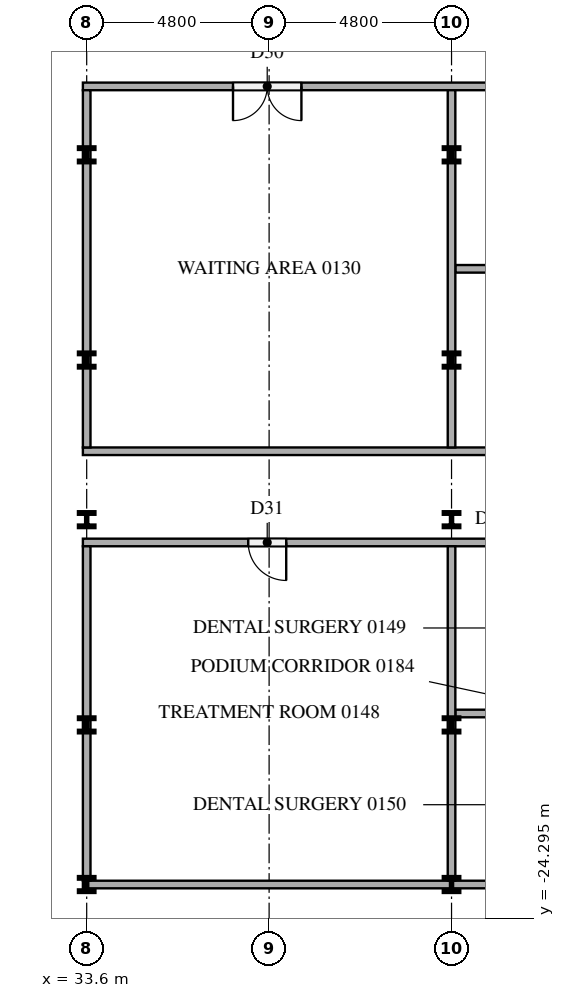
"""IFC4 building model, lengths in metres.
Left out: names, types, materials, properties, quantities, classifications, styles, units other than length and angle.
Written with IfcOpenShell. Run it as: python <this file> out.ifc"""

import sys

from ifc_helpers import new_model, si_unit, direction, frame, frame_2d, origin, origin_2d, place, context, subcontext, project, spatial, rectangle, i_section, extrude, element, fill, save


model = new_model("IFC4")
c1 = context("Model", 3, precision=1e-05, world=origin(), true_north=direction((0.0, 1.0)))
c2 = subcontext(c1, "Body", "Model", "MODEL_VIEW")
j1 = project(units=[si_unit("LENGTHUNIT", "METRE"), si_unit("PLANEANGLEUNIT", "RADIAN")], contexts=[c1])
p1 = place(None, origin())
s1 = spatial("IfcSite", under=j1, at=p1, CompositionType="ELEMENT")
p2 = place(p1, origin())
s2 = spatial("IfcBuilding", under=s1, at=p2, CompositionType="ELEMENT")
p3 = place(p2, frame((0.0, 0.0, 6.0)))
s3 = spatial("IfcBuildingStorey", under=s2, at=p3, CompositionType="ELEMENT", Elevation=6.0)
for number, where, z_axis, x_axis in (
    (1, (33.6, -23.4, 0.0), (0.0, 0.0, 1.0), (1.0, 0.0, 0.0)),
    (2, (33.6, -19.2, 0.0), (0.0, 0.0, 1.0), (1.0, 0.0, 0.0)),
    (3, (33.6, -13.8, 0.0), (0.0, 0.0, 1.0), (1.0, 0.0, 0.0)),
    (4, (33.6, -9.6, 0.0), (0.0, 0.0, 1.0), (1.0, 0.0, 0.0)),
    (5, (33.6, -4.2, 0.0), (0.0, 0.0, 1.0), (1.0, 0.0, 0.0)),
    (6, (43.2, -23.4, 0.0), (0.0, 0.0, 1.0), (1.0, 0.0, 0.0)),
    (7, (43.2, -19.2, 0.0), (0.0, 0.0, 1.0), (1.0, 0.0, 0.0)),
    (8, (43.2, -13.8, 0.0), (0.0, 0.0, 1.0), (1.0, 0.0, 0.0)),
    (9, (43.2, -9.6, 0.0), (0.0, 0.0, 1.0), (1.0, 0.0, 0.0)),
    (10, (43.2, -4.2, 0.0), (0.0, 0.0, 1.0), (1.0, 0.0, 0.0)),
):
    element("IfcColumn", number, at=place(p3, frame(where, z_axis=z_axis, x_axis=x_axis)), inside=s3, PredefinedType="COLUMN", context=c2, shape_type="SweptSolid", body=[
        extrude(i_section(OverallWidth=0.396, OverallDepth=0.381, WebThickness=0.019, FlangeThickness=0.03, at=origin_2d()), origin(), (0.0, 0.0, 1.0), 4.2),
    ])
p4 = place(p3, frame((33.5, -23.4, 0.0), z_axis=(0.0, 0.0, 1.0), x_axis=(1.0, 0.0, 0.0)))
e11 = element("IfcWall", 11, at=p4, inside=s3, PredefinedType="PARTITIONING", context=c2, shape_type="SweptSolid", body=[
    extrude(rectangle(XDim=33.8, YDim=0.2, at=frame_2d((16.9, 0.0))), origin(), (0.0, 0.0, 1.0), 4.2),
])
p5 = place(p4, frame((10.95, 0.0, 0.0)))
e12 = element("IfcOpeningElement", 12, at=p5, cuts=e11, PredefinedType="OPENING", context=c2, shape_type="SweptSolid", body=[
    extrude(rectangle(XDim=1.0, YDim=2.1, at=frame_2d((0.5, 1.05))), frame((0.0, 0.11, 0.0), z_axis=(0.0, -1.0, 0.0), x_axis=(1.0, 0.0, 0.0)), (0.0, 0.0, 1.0), 0.22),
])
p6 = place(p4, frame((15.75, 0.0, 0.0)))
e13 = element("IfcOpeningElement", 13, at=p6, cuts=e11, PredefinedType="OPENING", context=c2, shape_type="SweptSolid", body=[
    extrude(rectangle(XDim=1.0, YDim=2.1, at=frame_2d((0.5, 1.05))), frame((0.0, 0.11, 0.0), z_axis=(0.0, -1.0, 0.0), x_axis=(1.0, 0.0, 0.0)), (0.0, 0.0, 1.0), 0.22),
])
p7 = place(p4, frame((30.85, 0.0, 0.0)))
e14 = element("IfcOpeningElement", 14, at=p7, cuts=e11, PredefinedType="OPENING", context=c2, shape_type="SweptSolid", body=[
    extrude(rectangle(XDim=1.0, YDim=2.1, at=frame_2d((0.5, 1.05))), frame((0.0, 0.11, 0.0), z_axis=(0.0, -1.0, 0.0), x_axis=(1.0, 0.0, 0.0)), (0.0, 0.0, 1.0), 0.22),
])
p8 = place(p3, frame((43.3, -18.9, 0.0), z_axis=(0.0, 0.0, 1.0), x_axis=(1.0, 0.0, 0.0)))
e15 = element("IfcWall", 15, at=p8, inside=s3, PredefinedType="PARTITIONING", context=c2, shape_type="SweptSolid", body=[
    extrude(rectangle(XDim=9.4, YDim=0.2, at=frame_2d((4.7, 0.0))), origin(), (0.0, 0.0, 1.0), 4.2),
])
p9 = place(p3, frame((55.8, -14.4, 0.0), z_axis=(0.0, 0.0, 1.0), x_axis=(-1.0, 0.0, 0.0)))
e16 = element("IfcWall", 16, at=p9, inside=s3, PredefinedType="PARTITIONING", context=c2, shape_type="SweptSolid", body=[
    extrude(rectangle(XDim=22.3, YDim=0.2, at=frame_2d((11.15, 0.0))), origin(), (0.0, 0.0, 1.0), 4.2),
])
p10 = place(p9, frame((16.95, 0.0, 0.0)))
e17 = element("IfcOpeningElement", 17, at=p10, cuts=e16, PredefinedType="OPENING", context=c2, shape_type="SweptSolid", body=[
    extrude(rectangle(XDim=1.0, YDim=2.1, at=frame_2d((0.5, 1.05))), frame((0.0, 0.11, 0.0), z_axis=(0.0, -1.0, 0.0), x_axis=(1.0, 0.0, 0.0)), (0.0, 0.0, 1.0), 0.22),
])
p11 = place(p9, frame((10.25, 0.0, 0.0)))
e18 = element("IfcOpeningElement", 18, at=p11, cuts=e16, PredefinedType="OPENING", context=c2, shape_type="SweptSolid", body=[
    extrude(rectangle(XDim=1.0, YDim=2.1, at=frame_2d((0.5, 1.05))), frame((0.0, 0.11, 0.0), z_axis=(0.0, -1.0, 0.0), x_axis=(1.0, 0.0, 0.0)), (0.0, 0.0, 1.0), 0.22),
])
p12 = place(p9, frame((5.45, 0.0, 0.0)))
e19 = element("IfcOpeningElement", 19, at=p12, cuts=e16, PredefinedType="OPENING", context=c2, shape_type="SweptSolid", body=[
    extrude(rectangle(XDim=1.0, YDim=2.1, at=frame_2d((0.5, 1.05))), frame((0.0, 0.11, 0.0), z_axis=(0.0, -1.0, 0.0), x_axis=(1.0, 0.0, 0.0)), (0.0, 0.0, 1.0), 0.22),
])
p13 = place(p3, frame((33.5, -12.0, 0.0), z_axis=(0.0, 0.0, 1.0), x_axis=(1.0, 0.0, 0.0)))
e20 = element("IfcWall", 20, at=p13, inside=s3, PredefinedType="PARTITIONING", context=c2, shape_type="SweptSolid", body=[
    extrude(rectangle(XDim=33.8, YDim=0.2, at=frame_2d((16.9, 0.0))), origin(), (0.0, 0.0, 1.0), 4.2),
])
p14 = place(p13, frame((12.15, 0.0, 0.0)))
e21 = element("IfcOpeningElement", 21, at=p14, cuts=e20, PredefinedType="OPENING", context=c2, shape_type="SweptSolid", body=[
    extrude(rectangle(XDim=1.0, YDim=2.1, at=frame_2d((0.5, 1.05))), frame((0.0, 0.11, 0.0), z_axis=(0.0, -1.0, 0.0), x_axis=(1.0, 0.0, 0.0)), (0.0, 0.0, 1.0), 0.22),
])
p15 = place(p13, frame((17.55, 0.0, 0.0)))
e22 = element("IfcOpeningElement", 22, at=p15, cuts=e20, PredefinedType="OPENING", context=c2, shape_type="SweptSolid", body=[
    extrude(rectangle(XDim=1.0, YDim=2.1, at=frame_2d((0.5, 1.05))), frame((0.0, 0.11, 0.0), z_axis=(0.0, -1.0, 0.0), x_axis=(1.0, 0.0, 0.0)), (0.0, 0.0, 1.0), 0.22),
])
p16 = place(p13, frame((24.15, 0.0, 0.0)))
e23 = element("IfcOpeningElement", 23, at=p16, cuts=e20, PredefinedType="OPENING", context=c2, shape_type="SweptSolid", body=[
    extrude(rectangle(XDim=1.0, YDim=2.1, at=frame_2d((0.5, 1.05))), frame((0.0, 0.11, 0.0), z_axis=(0.0, -1.0, 0.0), x_axis=(1.0, 0.0, 0.0)), (0.0, 0.0, 1.0), 0.22),
])
p17 = place(p13, frame((30.85, 0.0, 0.0)))
e24 = element("IfcOpeningElement", 24, at=p17, cuts=e20, PredefinedType="OPENING", context=c2, shape_type="SweptSolid", body=[
    extrude(rectangle(XDim=1.0, YDim=2.1, at=frame_2d((0.5, 1.05))), frame((0.0, 0.11, 0.0), z_axis=(0.0, -1.0, 0.0), x_axis=(1.0, 0.0, 0.0)), (0.0, 0.0, 1.0), 0.22),
])
p18 = place(p3, frame((43.3, -7.2, 0.0), z_axis=(0.0, 0.0, 1.0), x_axis=(1.0, 0.0, 0.0)))
e25 = element("IfcWall", 25, at=p18, inside=s3, PredefinedType="PARTITIONING", context=c2, shape_type="SweptSolid", body=[
    extrude(rectangle(XDim=5.8, YDim=0.2, at=frame_2d((2.9, 0.0))), origin(), (0.0, 0.0, 1.0), 4.2),
])
p19 = place(p3, frame((67.3, -2.4, 0.0), z_axis=(0.0, 0.0, 1.0), x_axis=(-1.0, 0.0, 0.0)))
e26 = element("IfcWall", 26, at=p19, inside=s3, PredefinedType="PARTITIONING", context=c2, shape_type="SweptSolid", body=[
    extrude(rectangle(XDim=33.8, YDim=0.2, at=frame_2d((16.9, 0.0))), origin(), (0.0, 0.0, 1.0), 4.2),
])
p20 = place(p19, frame((28.05, 0.0, 0.0)))
e27 = element("IfcOpeningElement", 27, at=p20, cuts=e26, PredefinedType="OPENING", context=c2, shape_type="SweptSolid", body=[
    extrude(rectangle(XDim=1.8, YDim=2.1, at=frame_2d((0.9, 1.05))), frame((0.0, 0.11, 0.0), z_axis=(0.0, -1.0, 0.0), x_axis=(1.0, 0.0, 0.0)), (0.0, 0.0, 1.0), 0.22),
])
p21 = place(p19, frame((20.55, 0.0, 0.0)))
e28 = element("IfcOpeningElement", 28, at=p21, cuts=e26, PredefinedType="OPENING", context=c2, shape_type="SweptSolid", body=[
    extrude(rectangle(XDim=1.0, YDim=2.1, at=frame_2d((0.5, 1.05))), frame((0.0, 0.11, 0.0), z_axis=(0.0, -1.0, 0.0), x_axis=(1.0, 0.0, 0.0)), (0.0, 0.0, 1.0), 0.22),
])
p22 = place(p19, frame((8.55, 0.0, 0.0)))
e29 = element("IfcOpeningElement", 29, at=p22, cuts=e26, PredefinedType="OPENING", context=c2, shape_type="SweptSolid", body=[
    extrude(rectangle(XDim=1.0, YDim=2.1, at=frame_2d((0.5, 1.05))), frame((0.0, 0.11, 0.0), z_axis=(0.0, -1.0, 0.0), x_axis=(1.0, 0.0, 0.0)), (0.0, 0.0, 1.0), 0.22),
])
p23 = place(p3, frame((33.6, -23.3, 0.0), z_axis=(0.0, 0.0, 1.0), x_axis=(0.0, 1.0, 0.0)))
e30 = element("IfcWall", 30, at=p23, inside=s3, PredefinedType="PARTITIONING", context=c2, shape_type="SweptSolid", body=[
    extrude(rectangle(XDim=8.8, YDim=0.2, at=frame_2d((4.4, 0.0))), origin(), (0.0, 0.0, 1.0), 4.2),
])
p24 = place(p3, frame((33.6, -11.9, 0.0), z_axis=(0.0, 0.0, 1.0), x_axis=(0.0, 1.0, 0.0)))
e31 = element("IfcWall", 31, at=p24, inside=s3, PredefinedType="PARTITIONING", context=c2, shape_type="SweptSolid", body=[
    extrude(rectangle(XDim=9.4, YDim=0.2, at=frame_2d((4.7, 0.0))), origin(), (0.0, 0.0, 1.0), 4.2),
])
p25 = place(p3, frame((43.2, -23.3, 0.0), z_axis=(0.0, 0.0, 1.0), x_axis=(0.0, 1.0, 0.0)))
e32 = element("IfcWall", 32, at=p25, inside=s3, PredefinedType="PARTITIONING", context=c2, shape_type="SweptSolid", body=[
    extrude(rectangle(XDim=8.8, YDim=0.2, at=frame_2d((4.4, 0.0))), origin(), (0.0, 0.0, 1.0), 4.2),
])
p26 = place(p3, frame((43.2, -11.9, 0.0), z_axis=(0.0, 0.0, 1.0), x_axis=(0.0, 1.0, 0.0)))
e33 = element("IfcWall", 33, at=p26, inside=s3, PredefinedType="PARTITIONING", context=c2, shape_type="SweptSolid", body=[
    extrude(rectangle(XDim=9.4, YDim=0.2, at=frame_2d((4.7, 0.0))), origin(), (0.0, 0.0, 1.0), 4.2),
])
p27 = place(p20, origin())
e34 = element("IfcDoor", 34, at=p27, inside=s3, OperationType="DOUBLE_DOOR_SINGLE_SWING", PredefinedType="DOOR", context=c2, shape_type="SweptSolid", body=[
    extrude(rectangle(XDim=1.8, YDim=2.1, at=frame_2d((0.9, 1.05))), frame((0.0, 0.025, 0.0), z_axis=(0.0, -1.0, 0.0), x_axis=(1.0, 0.0, 0.0)), (0.0, 0.0, 1.0), 0.05),
])
fill(e27, e34)
p28 = place(p10, origin())
e35 = element("IfcDoor", 35, at=p28, inside=s3, OperationType="SINGLE_SWING_LEFT", PredefinedType="DOOR", context=c2, shape_type="SweptSolid", body=[
    extrude(rectangle(XDim=1.0, YDim=2.1, at=frame_2d((0.5, 1.05))), frame((0.0, 0.025, 0.0), z_axis=(0.0, -1.0, 0.0), x_axis=(1.0, 0.0, 0.0)), (0.0, 0.0, 1.0), 0.05),
])
fill(e17, e35)
save(model, sys.argv[1])
